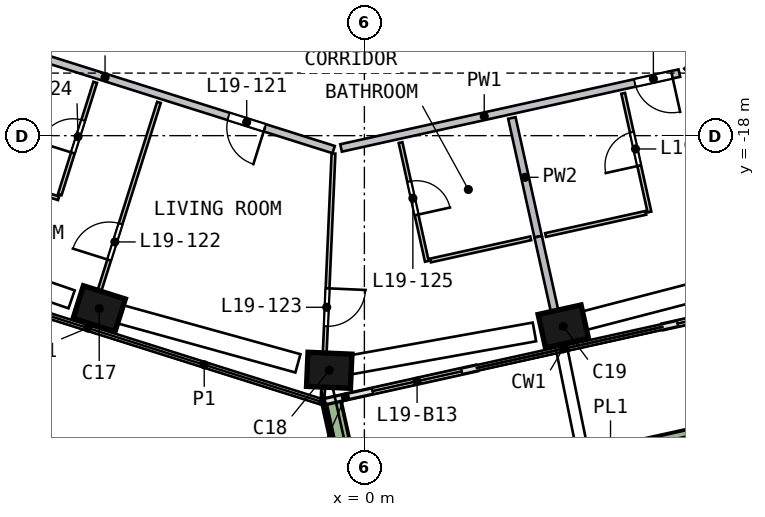
"""IFC4 building model, lengths in metres.
Left out: names, types, materials, properties, quantities, classifications, styles, units other than length and angle.
Written with IfcOpenShell. Run it as: python <this file> out.ifc"""

import sys

from ifc_helpers import new_model, si_unit, direction, frame, frame_2d, origin, origin_2d, place, context, subcontext, project, spatial, rectangle, extrude, element, fill, save


model = new_model("IFC4")
c1 = context("Model", 3, precision=1e-05, world=origin(), true_north=direction((0.0, 1.0)))
c2 = subcontext(c1, "Body", "Model", "MODEL_VIEW")
j1 = project(units=[si_unit("LENGTHUNIT", "METRE"), si_unit("PLANEANGLEUNIT", "RADIAN")], contexts=[c1])
p1 = place(None, origin())
s1 = spatial("IfcSite", under=j1, at=p1, CompositionType="ELEMENT")
p2 = place(p1, origin())
s2 = spatial("IfcBuilding", under=s1, at=p2, CompositionType="ELEMENT")
p3 = place(p2, frame((0.0, 0.0, 86.0)))
s3 = spatial("IfcBuildingStorey", under=s2, at=p3, CompositionType="ELEMENT", Elevation=86.0)
p4 = place(p3, frame((-7.107, -22.513, 0.0), z_axis=(0.107382919, -0.032929748, 0.99367225), x_axis=(0.947501295, -0.299377243, -0.11231457)))
e1 = element("IfcColumn", 1, at=p4, inside=s3, PredefinedType="COLUMN", context=c2, shape_type="SweptSolid", body=[
    extrude(rectangle(XDim=1.15, YDim=0.9, at=origin_2d()), origin(), (0.0, 0.0, 1.0), 3.21),
])
p5 = place(p3, frame((-1.064, -24.169, 0.0), z_axis=(0.114952103, -0.004105432, 0.993362552), x_axis=(-0.992393334, 0.043881327, 0.115021301)))
e2 = element("IfcColumn", 2, at=p5, inside=s3, PredefinedType="COLUMN", context=c2, shape_type="SweptSolid", body=[
    extrude(rectangle(XDim=1.15, YDim=0.9, at=origin_2d()), origin(), (0.0, 0.0, 1.0), 3.211),
])
p6 = place(p3, frame((5.102, -23.051, 0.0), z_axis=(0.109436366, 0.025248696, 0.993673078), x_axis=(0.970098725, 0.215163997, -0.112307249)))
e3 = element("IfcColumn", 3, at=p6, inside=s3, PredefinedType="COLUMN", context=c2, shape_type="SweptSolid", body=[
    extrude(rectangle(XDim=1.15, YDim=0.9, at=origin_2d()), origin(), (0.0, 0.0, 1.0), 3.21),
])
p7 = place(p3, frame((-1.023, -24.995, 0.0), z_axis=(0.0, 0.0, 1.0), x_axis=(0.976378736, 0.216066108, 0.0)))
e4 = element("IfcWall", 4, at=p7, inside=s3, PredefinedType="SOLIDWALL", context=c2, shape_type="SweptSolid", body=[
    extrude(rectangle(XDim=4.068, YDim=0.15, at=frame_2d((2.034, 0.0))), origin(), (0.0, 0.0, 1.0), 2.425),
])
p8 = place(p7, frame((1.268, 0.0, 0.0)))
e5 = element("IfcOpeningElement", 5, at=p8, cuts=e4, PredefinedType="OPENING", context=c2, shape_type="SweptSolid", body=[
    extrude(rectangle(XDim=2.4, YDim=2.4, at=frame_2d((1.2, 1.2))), frame((0.0, 0.085, 0.0), z_axis=(0.0, -1.0, 0.0), x_axis=(1.0, 0.0, 0.0)), (0.0, 0.0, 1.0), 0.17),
])
p9 = place(p3, frame((7.852, -23.031, 0.0), z_axis=(0.0, 0.0, 1.0), x_axis=(0.976372496, 0.216094304, 0.0)))
e6 = element("IfcWall", 6, at=p9, inside=s3, PredefinedType="SOLIDWALL", context=c2, shape_type="SweptSolid", body=[
    extrude(rectangle(XDim=3.71, YDim=0.15, at=frame_2d((1.855, 0.0))), origin(), (0.0, 0.0, 1.0), 2.425),
])
p10 = place(p9, frame((0.4, 0.0, 0.0)))
e7 = element("IfcOpeningElement", 7, at=p10, cuts=e6, PredefinedType="OPENING", context=c2, shape_type="SweptSolid", body=[
    extrude(rectangle(XDim=2.4, YDim=2.4, at=frame_2d((1.2, 1.2))), frame((0.0, 0.085, 0.0), z_axis=(0.0, -1.0, 0.0), x_axis=(1.0, 0.0, 0.0)), (0.0, 0.0, 1.0), 0.17),
])
p11 = place(p3, frame((-0.86, -25.037, 0.0), z_axis=(0.0, 0.0, 1.0), x_axis=(0.216049597, -0.97638239, 0.0)))
e8 = element("IfcWall", 8, at=p11, inside=s3, PredefinedType="SOLIDWALL", context=c2, shape_type="SweptSolid", body=[
    extrude(rectangle(XDim=3.199, YDim=0.5, at=frame_2d((1.6, 0.0))), origin(), (0.0, 0.0, 1.0), 0.7),
])
p12 = place(p3, frame((0.021, -27.862, 0.0), z_axis=(0.0, 0.0, 1.0), x_axis=(0.976369604, 0.216107373, 0.0)))
e9 = element("IfcWall", 9, at=p12, inside=s3, PredefinedType="SOLIDWALL", context=c2, shape_type="SweptSolid", body=[
    extrude(rectangle(XDim=13.223, YDim=0.5, at=frame_2d((6.612, 0.0))), origin(), (0.0, 0.0, 1.0), 0.7),
])
p13 = place(p3, frame((-0.808, -18.367, 0.0), z_axis=(0.0, 0.0, 1.0), x_axis=(-0.953616003, 0.301025777, 0.0)))
e10 = element("IfcWall", 10, at=p13, inside=s3, PredefinedType="SOLIDWALL", context=c2, shape_type="SweptSolid", body=[
    extrude(rectangle(XDim=9.517, YDim=0.2, at=frame_2d((4.758, 0.0))), origin(), (0.0, 0.0, 1.0), 3.19),
])
p14 = place(p13, frame((1.9, 0.0, 0.0)))
e11 = element("IfcOpeningElement", 11, at=p14, cuts=e10, PredefinedType="OPENING", context=c2, shape_type="SweptSolid", body=[
    extrude(rectangle(XDim=1.0, YDim=2.1, at=frame_2d((0.5, 1.05))), frame((0.0, 0.11, 0.0), z_axis=(0.0, -1.0, 0.0), x_axis=(1.0, 0.0, 0.0)), (0.0, 0.0, 1.0), 0.22),
])
p15 = place(p3, frame((8.288, -16.354, 0.0), z_axis=(0.0, 0.0, 1.0), x_axis=(-0.976371341, -0.216099524, 0.0)))
e12 = element("IfcWall", 12, at=p15, inside=s3, PredefinedType="SOLIDWALL", context=c2, shape_type="SweptSolid", body=[
    extrude(rectangle(XDim=9.116, YDim=0.2, at=frame_2d((4.558, 0.0))), origin(), (0.0, 0.0, 1.0), 3.19),
])
p16 = place(p15, frame((0.2, 0.0, 0.0)))
e13 = element("IfcOpeningElement", 13, at=p16, cuts=e12, PredefinedType="OPENING", context=c2, shape_type="SweptSolid", body=[
    extrude(rectangle(XDim=1.0, YDim=2.1, at=frame_2d((0.5, 1.05))), frame((0.0, 0.11, 0.0), z_axis=(0.0, -1.0, 0.0), x_axis=(1.0, 0.0, 0.0)), (0.0, 0.0, 1.0), 0.22),
])
p17 = place(p3, frame((8.484, -16.31, 0.0), z_axis=(0.0, 0.0, 1.0), x_axis=(0.737517179, 0.675328372, 0.0)))
e14 = element("IfcWall", 14, at=p17, inside=s3, PredefinedType="SOLIDWALL", context=c2, shape_type="SweptSolid", body=[
    extrude(rectangle(XDim=9.516, YDim=0.2, at=frame_2d((4.758, 0.0))), origin(), (0.0, 0.0, 1.0), 3.19),
])
p18 = place(p3, frame((3.881, -17.534, 0.0), z_axis=(0.0, 0.0, 1.0), x_axis=(0.216057954, -0.976380541, 0.0)))
e15 = element("IfcWall", 15, at=p18, inside=s3, PredefinedType="SOLIDWALL", context=c2, shape_type="SweptSolid", body=[
    extrude(rectangle(XDim=3.2, YDim=0.2, at=frame_2d((1.6, 0.0))), origin(), (0.0, 0.0, 1.0), 3.19),
])
p19 = place(p3, frame((4.572, -20.658, 0.0), z_axis=(0.0, 0.0, 1.0), x_axis=(0.216080405, -0.976375572, 0.0)))
e16 = element("IfcWall", 16, at=p19, inside=s3, PredefinedType="SOLIDWALL", context=c2, shape_type="SweptSolid", body=[
    extrude(rectangle(XDim=2.95, YDim=0.2, at=frame_2d((1.475, 0.0))), origin(), (0.0, 0.0, 1.0), 3.19),
])
p20 = place(p3, frame((-11.578, -18.532, 0.0), z_axis=(0.0, 0.0, 1.0), x_axis=(0.953617524, -0.301020959, 0.0)))
e17 = element("IfcWall", 17, at=p20, inside=s3, PredefinedType="PARTITIONING", context=c2, shape_type="SweptSolid", body=[
    extrude(rectangle(XDim=3.704, YDim=0.1, at=frame_2d((1.852, 0.0))), origin(), (0.0, 0.0, 1.0), 3.19),
])
p21 = place(p3, frame((-8.016, -19.552, 0.0), z_axis=(0.0, 0.0, 1.0), x_axis=(0.301018286, 0.953618368, 0.0)))
e18 = element("IfcWall", 18, at=p21, inside=s3, PredefinedType="PARTITIONING", context=c2, shape_type="SweptSolid", body=[
    extrude(rectangle(XDim=3.1, YDim=0.1, at=frame_2d((1.55, 0.0))), origin(), (0.0, 0.0, 1.0), 3.19),
])
p22 = place(p21, frame((1.15, 0.0, 0.0)))
e19 = element("IfcOpeningElement", 19, at=p22, cuts=e18, PredefinedType="OPENING", context=c2, shape_type="SweptSolid", body=[
    extrude(rectangle(XDim=0.9, YDim=2.1, at=frame_2d((0.45, 1.05))), frame((0.0, 0.06, 0.0), z_axis=(0.0, -1.0, 0.0), x_axis=(1.0, 0.0, 0.0)), (0.0, 0.0, 1.0), 0.12),
])
p23 = place(p3, frame((-7.258, -22.99, 0.0), z_axis=(0.0, 0.0, 1.0), x_axis=(0.301026872, 0.953615657, 0.0)))
e20 = element("IfcWall", 20, at=p23, inside=s3, PredefinedType="PARTITIONING", context=c2, shape_type="SweptSolid", body=[
    extrude(rectangle(XDim=6.15, YDim=0.1, at=frame_2d((3.075, 0.0))), origin(), (0.0, 0.0, 1.0), 3.19),
])
p24 = place(p23, frame((1.8, 0.0, 0.0)))
e21 = element("IfcOpeningElement", 21, at=p24, cuts=e20, PredefinedType="OPENING", context=c2, shape_type="SweptSolid", body=[
    extrude(rectangle(XDim=1.0, YDim=2.1, at=frame_2d((0.5, 1.05))), frame((0.0, 0.06, 0.0), z_axis=(0.0, -1.0, 0.0), x_axis=(1.0, 0.0, 0.0)), (0.0, 0.0, 1.0), 0.12),
])
p25 = place(p3, frame((-0.813, -18.47, 0.0), z_axis=(0.0, 0.0, 1.0), x_axis=(-0.043959125, -0.99903333, 0.0)))
e22 = element("IfcWall", 22, at=p25, inside=s3, PredefinedType="PARTITIONING", context=c2, shape_type="SweptSolid", body=[
    extrude(rectangle(XDim=6.476, YDim=0.1, at=frame_2d((3.238, 0.0))), origin(), (0.0, 0.0, 1.0), 3.19),
])
p26 = place(p25, frame((3.55, 0.0, 0.0)))
e23 = element("IfcOpeningElement", 23, at=p26, cuts=e22, PredefinedType="OPENING", context=c2, shape_type="SweptSolid", body=[
    extrude(rectangle(XDim=1.0, YDim=2.1, at=frame_2d((0.5, 1.05))), frame((0.0, 0.06, 0.0), z_axis=(0.0, -1.0, 0.0), x_axis=(1.0, 0.0, 0.0)), (0.0, 0.0, 1.0), 0.12),
])
p27 = place(p3, frame((0.952, -18.182, 0.0), z_axis=(0.0, 0.0, 1.0), x_axis=(0.216146782, -0.97636088, 0.0)))
e24 = element("IfcWall", 24, at=p27, inside=s3, PredefinedType="PARTITIONING", context=c2, shape_type="SweptSolid", body=[
    extrude(rectangle(XDim=3.2, YDim=0.1, at=frame_2d((1.6, 0.0))), origin(), (0.0, 0.0, 1.0), 3.19),
])
p28 = place(p27, frame((1.05, 0.0, 0.0)))
e25 = element("IfcOpeningElement", 25, at=p28, cuts=e24, PredefinedType="OPENING", context=c2, shape_type="SweptSolid", body=[
    extrude(rectangle(XDim=0.9, YDim=2.1, at=frame_2d((0.45, 1.05))), frame((0.0, 0.06, 0.0), z_axis=(0.0, -1.0, 0.0), x_axis=(1.0, 0.0, 0.0)), (0.0, 0.0, 1.0), 0.12),
])
for number, where, z_axis, x_axis in (
    (26, (1.741, -21.285, 0.0), (0.0, 0.0, 1.0), (0.976, 0.216, 0.0)),
    (27, (7.404, -20.032, 0.0), (0.0, 0.0, 1.0), (-0.976, -0.216, 0.0)),
):
    element("IfcWall", number, at=place(p3, frame(where, z_axis=z_axis, x_axis=x_axis)), inside=s3, PredefinedType="PARTITIONING", context=c2, shape_type="SweptSolid", body=[
        extrude(rectangle(XDim=2.7, YDim=0.1, at=frame_2d((1.35, 0.0))), origin(), (0.0, 0.0, 1.0), 3.19),
    ])
p29 = place(p3, frame((7.501, -20.01, 0.0), z_axis=(0.0, 0.0, 1.0), x_axis=(-0.216146782, 0.97636088, 0.0)))
e28 = element("IfcWall", 28, at=p29, inside=s3, PredefinedType="PARTITIONING", context=c2, shape_type="SweptSolid", body=[
    extrude(rectangle(XDim=3.2, YDim=0.1, at=frame_2d((1.6, 0.0))), origin(), (0.0, 0.0, 1.0), 3.19),
])
p30 = place(p29, frame((1.25, 0.0, 0.0)))
e29 = element("IfcOpeningElement", 29, at=p30, cuts=e28, PredefinedType="OPENING", context=c2, shape_type="SweptSolid", body=[
    extrude(rectangle(XDim=0.9, YDim=2.1, at=frame_2d((0.45, 1.05))), frame((0.0, 0.06, 0.0), z_axis=(0.0, -1.0, 0.0), x_axis=(1.0, 0.0, 0.0)), (0.0, 0.0, 1.0), 0.12),
])
p31 = place(p8, origin())
e30 = element("IfcDoor", 30, at=p31, inside=s3, OperationType="SLIDING_TO_LEFT", PredefinedType="DOOR", context=c2, shape_type="SweptSolid", body=[
    extrude(rectangle(XDim=2.4, YDim=2.4, at=frame_2d((1.2, 1.2))), frame((0.0, 0.025, 0.0), z_axis=(0.0, -1.0, 0.0), x_axis=(1.0, 0.0, 0.0)), (0.0, 0.0, 1.0), 0.05),
])
fill(e5, e30)
p32 = place(p10, origin())
e31 = element("IfcDoor", 31, at=p32, inside=s3, OperationType="SLIDING_TO_RIGHT", PredefinedType="DOOR", context=c2, shape_type="SweptSolid", body=[
    extrude(rectangle(XDim=2.4, YDim=2.4, at=frame_2d((1.2, 1.2))), frame((0.0, 0.025, 0.0), z_axis=(0.0, -1.0, 0.0), x_axis=(1.0, 0.0, 0.0)), (0.0, 0.0, 1.0), 0.05),
])
fill(e7, e31)
p33 = place(p14, origin())
e32 = element("IfcDoor", 32, at=p33, inside=s3, OperationType="SINGLE_SWING_LEFT", PredefinedType="DOOR", context=c2, shape_type="SweptSolid", body=[
    extrude(rectangle(XDim=1.0, YDim=2.1, at=frame_2d((0.5, 1.05))), frame((0.0, 0.025, 0.0), z_axis=(0.0, -1.0, 0.0), x_axis=(1.0, 0.0, 0.0)), (0.0, 0.0, 1.0), 0.05),
])
fill(e11, e32)
p34 = place(p24, origin())
e33 = element("IfcDoor", 33, at=p34, inside=s3, OperationType="SINGLE_SWING_LEFT", PredefinedType="DOOR", context=c2, shape_type="SweptSolid", body=[
    extrude(rectangle(XDim=1.0, YDim=2.1, at=frame_2d((0.5, 1.05))), frame((0.0, 0.025, 0.0), z_axis=(0.0, -1.0, 0.0), x_axis=(1.0, 0.0, 0.0)), (0.0, 0.0, 1.0), 0.05),
])
fill(e21, e33)
p35 = place(p26, origin())
e34 = element("IfcDoor", 34, at=p35, inside=s3, OperationType="SINGLE_SWING_LEFT", PredefinedType="DOOR", context=c2, shape_type="SweptSolid", body=[
    extrude(rectangle(XDim=1.0, YDim=2.1, at=frame_2d((0.5, 1.05))), frame((0.0, 0.025, 0.0), z_axis=(0.0, -1.0, 0.0), x_axis=(1.0, 0.0, 0.0)), (0.0, 0.0, 1.0), 0.05),
])
fill(e23, e34)
p36 = place(p22, origin())
e35 = element("IfcDoor", 35, at=p36, inside=s3, OperationType="SINGLE_SWING_LEFT", PredefinedType="DOOR", context=c2, shape_type="SweptSolid", body=[
    extrude(rectangle(XDim=0.9, YDim=2.1, at=frame_2d((0.45, 1.05))), frame((0.0, 0.025, 0.0), z_axis=(0.0, -1.0, 0.0), x_axis=(1.0, 0.0, 0.0)), (0.0, 0.0, 1.0), 0.05),
])
fill(e19, e35)
p37 = place(p28, origin())
e36 = element("IfcDoor", 36, at=p37, inside=s3, OperationType="SINGLE_SWING_RIGHT", PredefinedType="DOOR", context=c2, shape_type="SweptSolid", body=[
    extrude(rectangle(XDim=0.9, YDim=2.1, at=frame_2d((0.45, 1.05))), frame((0.0, 0.025, 0.0), z_axis=(0.0, -1.0, 0.0), x_axis=(1.0, 0.0, 0.0)), (0.0, 0.0, 1.0), 0.05),
])
fill(e25, e36)
p38 = place(p16, origin())
e37 = element("IfcDoor", 37, at=p38, inside=s3, OperationType="SINGLE_SWING_LEFT", PredefinedType="DOOR", context=c2, shape_type="SweptSolid", body=[
    extrude(rectangle(XDim=1.0, YDim=2.1, at=frame_2d((0.5, 1.05))), frame((0.0, 0.025, 0.0), z_axis=(0.0, -1.0, 0.0), x_axis=(1.0, 0.0, 0.0)), (0.0, 0.0, 1.0), 0.05),
])
fill(e13, e37)
p39 = place(p30, origin())
e38 = element("IfcDoor", 38, at=p39, inside=s3, OperationType="SINGLE_SWING_LEFT", PredefinedType="DOOR", context=c2, shape_type="SweptSolid", body=[
    extrude(rectangle(XDim=0.9, YDim=2.1, at=frame_2d((0.45, 1.05))), frame((0.0, 0.025, 0.0), z_axis=(0.0, -1.0, 0.0), x_axis=(1.0, 0.0, 0.0)), (0.0, 0.0, 1.0), 0.05),
])
fill(e29, e38)
save(model, sys.argv[1])
